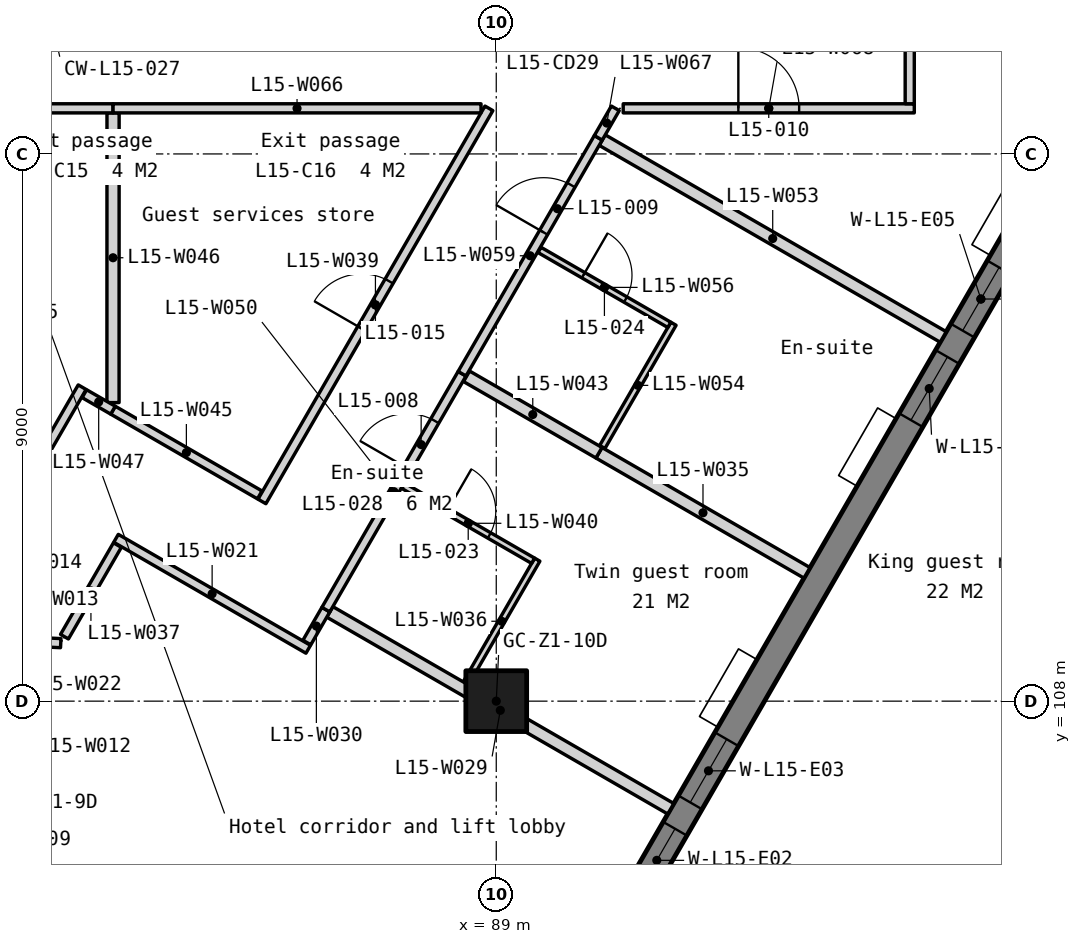
"""IFC4 building model, lengths in metres.
Left out: names, types, materials, properties, quantities, classifications, styles, units other than length and angle.
Written with IfcOpenShell. Run it as: python <this file> out.ifc"""

import sys

from ifc_helpers import new_model, si_unit, direction, frame, frame_2d, origin, origin_2d, place, context, subcontext, project, spatial, polyline, rectangle, outline, extrude, element, fill, save


model = new_model("IFC4")
c1 = context("Model", 3, precision=1e-05, world=origin(), true_north=direction((0.0, 1.0)))
c2 = subcontext(c1, "Body", "Model", "MODEL_VIEW")
j1 = project(units=[si_unit("LENGTHUNIT", "METRE"), si_unit("PLANEANGLEUNIT", "RADIAN")], contexts=[c1])
p1 = place(None, origin())
s1 = spatial("IfcSite", under=j1, at=p1, CompositionType="ELEMENT")
p2 = place(p1, origin())
s2 = spatial("IfcBuilding", under=s1, at=p2, CompositionType="ELEMENT")
p3 = place(p2, frame((0.0, 0.0, 66.5)))
s3 = spatial("IfcBuildingStorey", under=s2, at=p3, CompositionType="ELEMENT", Elevation=66.5)
p4 = place(p3, frame((89.0, 108.0, 0.0), z_axis=(0.0, 0.0, 1.0), x_axis=(1.0, 0.0, 0.0)))
e1 = element("IfcColumn", 1, at=p4, inside=s3, PredefinedType="COLUMN", context=c2, shape_type="SweptSolid", body=[
    extrude(rectangle(XDim=1.0, YDim=1.0, at=origin_2d()), origin(), (0.0, 0.0, 1.0), 3.5),
])
p5 = place(p3, frame((88.435, 99.831, -0.15), z_axis=(0.0, 0.0, 1.0), x_axis=(0.500000806382, 0.866024938219, 0.0)))
e2 = element("IfcWall", 2, at=p5, inside=s3, PredefinedType="SOLIDWALL", context=c2, shape_type="SweptSolid", body=[
    extrude(outline(polyline([(34.14, 3.5), (34.14, 0.0), (0.0, 0.0), (0.0, 3.5), (34.14, 3.5)])), frame((0.0, 0.225, 0.0), z_axis=(0.0, -1.0, 0.0), x_axis=(1.0, 0.0, 0.0)), (0.0, 0.0, 1.0), 0.45),
])
p6 = place(p5, frame((5.81, 0.0, 1.05)))
e3 = element("IfcOpeningElement", 3, at=p6, cuts=e2, PredefinedType="OPENING", context=c2, shape_type="SweptSolid", body=[
    extrude(rectangle(XDim=1.2, YDim=1.5, at=frame_2d((0.6, 0.75))), frame((0.0, 0.235, 0.0), z_axis=(0.0, -1.0, 0.0), x_axis=(1.0, 0.0, 0.0)), (0.0, 0.0, 1.0), 0.47),
])
p7 = place(p5, frame((7.51, 0.0, 1.05)))
e4 = element("IfcOpeningElement", 4, at=p7, cuts=e2, PredefinedType="OPENING", context=c2, shape_type="SweptSolid", body=[
    extrude(rectangle(XDim=1.2, YDim=1.5, at=frame_2d((0.6, 0.75))), frame((0.0, 0.235, 0.0), z_axis=(0.0, -1.0, 0.0), x_axis=(1.0, 0.0, 0.0)), (0.0, 0.0, 1.0), 0.47),
])
p8 = place(p5, frame((14.77, 0.0, 1.05)))
e5 = element("IfcOpeningElement", 5, at=p8, cuts=e2, PredefinedType="OPENING", context=c2, shape_type="SweptSolid", body=[
    extrude(rectangle(XDim=1.2, YDim=1.5, at=frame_2d((0.6, 0.75))), frame((0.0, 0.235, 0.0), z_axis=(0.0, -1.0, 0.0), x_axis=(1.0, 0.0, 0.0)), (0.0, 0.0, 1.0), 0.47),
])
p9 = place(p5, frame((16.47, 0.0, 1.05)))
e6 = element("IfcOpeningElement", 6, at=p9, cuts=e2, PredefinedType="OPENING", context=c2, shape_type="SweptSolid", body=[
    extrude(rectangle(XDim=1.2, YDim=1.5, at=frame_2d((0.6, 0.75))), frame((0.0, 0.235, 0.0), z_axis=(0.0, -1.0, 0.0), x_axis=(1.0, 0.0, 0.0)), (0.0, 0.0, 1.0), 0.47),
])
p10 = place(p5, frame((23.73, 0.0, 1.05)))
e7 = element("IfcOpeningElement", 7, at=p10, cuts=e2, PredefinedType="OPENING", context=c2, shape_type="SweptSolid", body=[
    extrude(rectangle(XDim=1.2, YDim=1.5, at=frame_2d((0.6, 0.75))), frame((0.0, 0.235, 0.0), z_axis=(0.0, -1.0, 0.0), x_axis=(1.0, 0.0, 0.0)), (0.0, 0.0, 1.0), 0.47),
])
p11 = place(p5, frame((25.43, 0.0, 1.05)))
e8 = element("IfcOpeningElement", 8, at=p11, cuts=e2, PredefinedType="OPENING", context=c2, shape_type="SweptSolid", body=[
    extrude(rectangle(XDim=1.2, YDim=1.5, at=frame_2d((0.6, 0.75))), frame((0.0, 0.235, 0.0), z_axis=(0.0, -1.0, 0.0), x_axis=(1.0, 0.0, 0.0)), (0.0, 0.0, 1.0), 0.47),
])
p12 = place(p5, frame((32.218, 0.0, 1.05)))
e9 = element("IfcOpeningElement", 9, at=p12, cuts=e2, PredefinedType="OPENING", context=c2, shape_type="SweptSolid", body=[
    extrude(rectangle(XDim=1.2, YDim=1.5, at=frame_2d((0.6, 0.75))), frame((0.0, 0.235, 0.0), z_axis=(0.0, -1.0, 0.0), x_axis=(1.0, 0.0, 0.0)), (0.0, 0.0, 1.0), 0.47),
])
p13 = place(p3, frame((82.747, 110.678, 0.0), z_axis=(0.0, 0.0, 1.0), x_axis=(0.866024069551, -0.500002310952, 0.0)))
e10 = element("IfcWall", 10, at=p13, inside=s3, PredefinedType="PARTITIONING", context=c2, shape_type="SweptSolid", body=[
    extrude(rectangle(XDim=3.65, YDim=0.15, at=frame_2d((1.825, 0.0))), origin(), (0.0, 0.0, 1.0), 3.35),
])
p14 = place(p3, frame((80.9, 109.0, 0.0), z_axis=(0.0, 0.0, 1.0), x_axis=(0.998790953554, -0.049159242245, 0.0)))
e11 = element("IfcWall", 11, at=p14, inside=s3, PredefinedType="PARTITIONING", context=c2, shape_type="SweptSolid", body=[
    extrude(rectangle(XDim=0.939, YDim=0.15, at=frame_2d((0.469, 0.0))), origin(), (0.0, 0.0, 1.0), 3.35),
])
p15 = place(p3, frame((79.852, 109.112, 0.0), z_axis=(0.0, 0.0, 1.0), x_axis=(0.499871526978, 0.866099565013, 0.0)))
e12 = element("IfcWall", 12, at=p15, inside=s3, PredefinedType="PARTITIONING", context=c2, shape_type="SweptSolid", body=[
    extrude(rectangle(XDim=4.678, YDim=0.15, at=frame_2d((2.339, 0.0))), origin(), (0.0, 0.0, 1.0), 3.35),
])
p16 = place(p15, frame((1.889, 0.0, 0.0)))
e13 = element("IfcOpeningElement", 13, at=p16, cuts=e12, PredefinedType="OPENING", context=c2, shape_type="SweptSolid", body=[
    extrude(rectangle(XDim=0.9, YDim=2.1, at=frame_2d((0.45, 1.05))), frame((0.0, 0.085, 0.0), z_axis=(0.0, -1.0, 0.0), x_axis=(1.0, 0.0, 0.0)), (0.0, 0.0, 1.0), 0.17),
])
p17 = place(p3, frame((86.263, 109.468, 0.0), z_axis=(0.0, 0.0, 1.0), x_axis=(0.866027988781, -0.499995522627, 0.0)))
e14 = element("IfcWall", 14, at=p17, inside=s3, PredefinedType="PARTITIONING", context=c2, shape_type="SweptSolid", body=[
    extrude(rectangle(XDim=6.475, YDim=0.2, at=frame_2d((3.238, 0.0))), origin(), (0.0, 0.0, 1.0), 3.35),
])
p18 = place(p3, frame((85.885, 108.964, 0.0), z_axis=(0.0, 0.0, 1.0), x_axis=(0.500004234368, 0.866022959057, 0.0)))
e15 = element("IfcWall", 15, at=p18, inside=s3, PredefinedType="PARTITIONING", context=c2, shape_type="SweptSolid", body=[
    extrude(rectangle(XDim=0.625, YDim=0.15, at=frame_2d((0.312, 0.0))), origin(), (0.0, 0.0, 1.0), 3.35),
])
p19 = place(p3, frame((90.689, 112.085, 0.0), z_axis=(0.0, 0.0, 1.0), x_axis=(0.866047669374, -0.499961432884, 0.0)))
e16 = element("IfcWall", 16, at=p19, inside=s3, PredefinedType="PARTITIONING", context=c2, shape_type="SweptSolid", body=[
    extrude(rectangle(XDim=3.95, YDim=0.2, at=frame_2d((1.975, 0.0))), origin(), (0.0, 0.0, 1.0), 3.35),
])
p20 = place(p3, frame((88.504, 108.301, 0.0), z_axis=(0.0, 0.0, 1.0), x_axis=(0.500077683152, 0.86598054875, 0.0)))
e17 = element("IfcWall", 17, at=p20, inside=s3, PredefinedType="PARTITIONING", context=c2, shape_type="SweptSolid", body=[
    extrude(rectangle(XDim=2.34, YDim=0.1, at=frame_2d((1.17, 0.0))), origin(), (0.0, 0.0, 1.0), 3.35),
])
p21 = place(p3, frame((81.899, 109.06, 0.0), z_axis=(0.0, 0.0, 1.0), x_axis=(0.50022850446, 0.865893436472, 0.0)))
e18 = element("IfcWall", 18, at=p21, inside=s3, PredefinedType="PARTITIONING", context=c2, shape_type="SweptSolid", body=[
    extrude(rectangle(XDim=1.74, YDim=0.15, at=frame_2d((0.87, 0.0))), origin(), (0.0, 0.0, 1.0), 3.35),
])
p22 = place(p3, frame((85.146, 111.284, 0.0), z_axis=(0.0, 0.0, 1.0), x_axis=(0.500000804965, 0.866024939037, 0.0)))
e19 = element("IfcWall", 19, at=p22, inside=s3, PredefinedType="PARTITIONING", context=c2, shape_type="SweptSolid", body=[
    extrude(rectangle(XDim=7.466, YDim=0.15, at=frame_2d((3.733, 0.0))), origin(), (0.0, 0.0, 1.0), 3.35),
])
p23 = place(p22, frame((3.283, 0.0, 0.0)))
e20 = element("IfcOpeningElement", 20, at=p23, cuts=e19, PredefinedType="OPENING", context=c2, shape_type="SweptSolid", body=[
    extrude(rectangle(XDim=0.9, YDim=2.1, at=frame_2d((0.45, 1.05))), frame((0.0, 0.085, 0.0), z_axis=(0.0, -1.0, 0.0), x_axis=(1.0, 0.0, 0.0)), (0.0, 0.0, 1.0), 0.17),
])
p24 = place(p3, frame((87.471, 111.542, 0.0), z_axis=(0.0, 0.0, 1.0), x_axis=(0.865997559407, -0.500048224776, 0.0)))
e21 = element("IfcWall", 21, at=p24, inside=s3, PredefinedType="PARTITIONING", context=c2, shape_type="SweptSolid", body=[
    extrude(rectangle(XDim=2.465, YDim=0.1, at=frame_2d((1.232, 0.0))), origin(), (0.0, 0.0, 1.0), 3.35),
])
p25 = place(p24, frame((0.833, 0.0, 0.0)))
e22 = element("IfcOpeningElement", 22, at=p25, cuts=e21, PredefinedType="OPENING", context=c2, shape_type="SweptSolid", body=[
    extrude(rectangle(XDim=0.8, YDim=2.1, at=frame_2d((0.4, 1.05))), frame((0.0, 0.06, 0.0), z_axis=(0.0, -1.0, 0.0), x_axis=(1.0, 0.0, 0.0)), (0.0, 0.0, 1.0), 0.12),
])
p26 = place(p3, frame((88.511, 113.343, 0.0), z_axis=(0.0, 0.0, 1.0), x_axis=(0.866006140796, -0.500033362991, 0.0)))
e23 = element("IfcWall", 23, at=p26, inside=s3, PredefinedType="PARTITIONING", context=c2, shape_type="SweptSolid", body=[
    extrude(rectangle(XDim=2.515, YDim=0.2, at=frame_2d((1.257, 0.0))), origin(), (0.0, 0.0, 1.0), 3.35),
])
p27 = place(p3, frame((82.697, 112.785, 0.0), z_axis=(0.0, 0.0, 1.0), x_axis=(0.865991541626, -0.500058646393, 0.0)))
e24 = element("IfcWall", 24, at=p27, inside=s3, PredefinedType="PARTITIONING", context=c2, shape_type="SweptSolid", body=[
    extrude(rectangle(XDim=2.787, YDim=0.15, at=frame_2d((1.394, 0.0))), origin(), (0.0, 0.0, 1.0), 3.35),
])
p28 = place(p3, frame((82.697, 112.91, 0.0), z_axis=(0.0, 0.0, 1.0), x_axis=(0.000204960028, 0.999999978996, 0.0)))
e25 = element("IfcWall", 25, at=p28, inside=s3, PredefinedType="PARTITIONING", context=c2, shape_type="SweptSolid", body=[
    extrude(rectangle(XDim=4.765, YDim=0.2, at=frame_2d((2.382, 0.0))), origin(), (0.0, 0.0, 1.0), 3.35),
])
p29 = place(p3, frame((82.226, 113.057, 0.0), z_axis=(0.0, 0.0, 1.0), x_axis=(0.866439850202, -0.499281469696, 0.0)))
e26 = element("IfcWall", 26, at=p29, inside=s3, PredefinedType="PARTITIONING", context=c2, shape_type="SweptSolid", body=[
    extrude(rectangle(XDim=0.543, YDim=0.15, at=frame_2d((0.271, 0.0))), origin(), (0.0, 0.0, 1.0), 3.35),
])
p30 = place(p3, frame((86.198, 109.505, 0.0), z_axis=(0.0, 0.0, 1.0), x_axis=(0.499989762656, 0.866031314237, 0.0)))
e27 = element("IfcWall", 27, at=p30, inside=s3, PredefinedType="PARTITIONING", context=c2, shape_type="SweptSolid", body=[
    extrude(rectangle(XDim=4.48, YDim=0.15, at=frame_2d((2.24, 0.0))), origin(), (0.0, 0.0, 1.0), 3.35),
])
p31 = place(p30, frame((2.684, 0.0, 0.0)))
e28 = element("IfcOpeningElement", 28, at=p31, cuts=e27, PredefinedType="OPENING", context=c2, shape_type="SweptSolid", body=[
    extrude(rectangle(XDim=0.9, YDim=2.1, at=frame_2d((0.45, 1.05))), frame((0.0, 0.085, 0.0), z_axis=(0.0, -1.0, 0.0), x_axis=(1.0, 0.0, 0.0)), (0.0, 0.0, 1.0), 0.17),
])
p32 = place(p3, frame((90.743, 117.228, 0.0), z_axis=(0.0, 0.0, 1.0), x_axis=(0.866027988781, -0.499995522627, 0.0)))
e29 = element("IfcWall", 29, at=p32, inside=s3, PredefinedType="PARTITIONING", context=c2, shape_type="SweptSolid", body=[
    extrude(rectangle(XDim=6.475, YDim=0.2, at=frame_2d((3.238, 0.0))), origin(), (0.0, 0.0, 1.0), 3.35),
])
p33 = place(p3, frame((90.744, 112.18, 0.0), z_axis=(0.0, 0.0, 1.0), x_axis=(0.500032503492, 0.866006637072, 0.0)))
e30 = element("IfcWall", 30, at=p33, inside=s3, PredefinedType="PARTITIONING", context=c2, shape_type="SweptSolid", body=[
    extrude(rectangle(XDim=2.34, YDim=0.1, at=frame_2d((1.17, 0.0))), origin(), (0.0, 0.0, 1.0), 3.35),
])
p34 = place(p3, frame((89.711, 115.421, 0.0), z_axis=(0.0, 0.0, 1.0), x_axis=(0.866040446274, -0.499973944738, 0.0)))
e31 = element("IfcWall", 31, at=p34, inside=s3, PredefinedType="PARTITIONING", context=c2, shape_type="SweptSolid", body=[
    extrude(rectangle(XDim=2.465, YDim=0.1, at=frame_2d((1.232, 0.0))), origin(), (0.0, 0.0, 1.0), 3.35),
])
p35 = place(p34, frame((0.833, 0.0, 0.0)))
e32 = element("IfcOpeningElement", 32, at=p35, cuts=e31, PredefinedType="OPENING", context=c2, shape_type="SweptSolid", body=[
    extrude(rectangle(XDim=0.8, YDim=2.1, at=frame_2d((0.4, 1.05))), frame((0.0, 0.06, 0.0), z_axis=(0.0, -1.0, 0.0), x_axis=(1.0, 0.0, 0.0)), (0.0, 0.0, 1.0), 0.12),
])
p36 = place(p3, frame((88.438, 113.385, 0.0), z_axis=(0.0, 0.0, 1.0), x_axis=(0.499989762656, 0.866031314237, 0.0)))
e33 = element("IfcWall", 33, at=p36, inside=s3, PredefinedType="PARTITIONING", context=c2, shape_type="SweptSolid", body=[
    extrude(rectangle(XDim=4.48, YDim=0.15, at=frame_2d((2.24, 0.0))), origin(), (0.0, 0.0, 1.0), 3.35),
])
p37 = place(p36, frame((2.684, 0.0, 0.0)))
e34 = element("IfcOpeningElement", 34, at=p37, cuts=e33, PredefinedType="OPENING", context=c2, shape_type="SweptSolid", body=[
    extrude(rectangle(XDim=0.9, YDim=2.1, at=frame_2d((0.45, 1.05))), frame((0.0, 0.085, 0.0), z_axis=(0.0, -1.0, 0.0), x_axis=(1.0, 0.0, 0.0)), (0.0, 0.0, 1.0), 0.17),
])
p38 = place(p3, frame((78.994, 117.75, 0.0), z_axis=(0.0, 0.0, 1.0), x_axis=(1.0, 0.0, 0.0)))
e35 = element("IfcWall", 35, at=p38, inside=s3, PredefinedType="PARTITIONING", context=c2, shape_type="SweptSolid", body=[
    extrude(rectangle(XDim=3.704, YDim=0.15, at=frame_2d((1.852, 0.0))), origin(), (0.0, 0.0, 1.0), 3.35),
])
p39 = place(p3, frame((82.698, 117.75, 0.0), z_axis=(0.0, 0.0, 1.0), x_axis=(1.0, 0.0, 0.0)))
e36 = element("IfcWall", 36, at=p39, inside=s3, PredefinedType="PARTITIONING", context=c2, shape_type="SweptSolid", body=[
    extrude(rectangle(XDim=6.052, YDim=0.15, at=frame_2d((3.026, 0.0))), origin(), (0.0, 0.0, 1.0), 3.35),
])
p40 = place(p3, frame((90.678, 117.265, 0.0), z_axis=(0.0, 0.0, 1.0), x_axis=(0.50012503653, 0.865953201874, 0.0)))
e37 = element("IfcWall", 37, at=p40, inside=s3, PredefinedType="PARTITIONING", context=c2, shape_type="SweptSolid", body=[
    extrude(rectangle(XDim=0.56, YDim=0.15, at=frame_2d((0.28, 0.0))), origin(), (0.0, 0.0, 1.0), 3.35),
])
p41 = place(p3, frame((91.088, 117.75, 0.0), z_axis=(0.0, 0.0, 1.0), x_axis=(1.0, 0.0, 0.0)))
e38 = element("IfcWall", 38, at=p41, inside=s3, PredefinedType="PARTITIONING", context=c2, shape_type="SweptSolid", body=[
    extrude(rectangle(XDim=4.787, YDim=0.15, at=frame_2d((2.394, 0.0))), origin(), (0.0, 0.0, 1.0), 3.35),
])
p42 = place(p41, frame((1.894, 0.0, 0.0)))
e39 = element("IfcOpeningElement", 39, at=p42, cuts=e38, PredefinedType="OPENING", context=c2, shape_type="SweptSolid", body=[
    extrude(rectangle(XDim=1.0, YDim=2.1, at=frame_2d((0.5, 1.05))), frame((0.0, 0.085, 0.0), z_axis=(0.0, -1.0, 0.0), x_axis=(1.0, 0.0, 0.0)), (0.0, 0.0, 1.0), 0.17),
])
p43 = place(p3, frame((95.8, 117.825, 0.0), z_axis=(0.0, 0.0, 1.0), x_axis=(0.0, 1.0, 0.0)))
e40 = element("IfcWall", 40, at=p43, inside=s3, PredefinedType="PARTITIONING", context=c2, shape_type="SweptSolid", body=[
    extrude(rectangle(XDim=3.711, YDim=0.15, at=frame_2d((1.855, 0.0))), origin(), (0.0, 0.0, 1.0), 3.35),
])
p44 = place(p6, origin())
e41 = element("IfcWindow", 41, at=p44, inside=s3, PartitioningType="SINGLE_PANEL", PredefinedType="WINDOW", context=c2, shape_type="SweptSolid", body=[
    extrude(rectangle(XDim=1.2, YDim=1.5, at=frame_2d((0.6, 0.75))), frame((0.0, 0.03, 0.0), z_axis=(0.0, -1.0, 0.0), x_axis=(1.0, 0.0, 0.0)), (0.0, 0.0, 1.0), 0.06),
])
fill(e3, e41)
p45 = place(p7, origin())
e42 = element("IfcWindow", 42, at=p45, inside=s3, PartitioningType="SINGLE_PANEL", PredefinedType="WINDOW", context=c2, shape_type="SweptSolid", body=[
    extrude(rectangle(XDim=1.2, YDim=1.5, at=frame_2d((0.6, 0.75))), frame((0.0, 0.03, 0.0), z_axis=(0.0, -1.0, 0.0), x_axis=(1.0, 0.0, 0.0)), (0.0, 0.0, 1.0), 0.06),
])
fill(e4, e42)
p46 = place(p8, origin())
e43 = element("IfcWindow", 43, at=p46, inside=s3, PartitioningType="SINGLE_PANEL", PredefinedType="WINDOW", context=c2, shape_type="SweptSolid", body=[
    extrude(rectangle(XDim=1.2, YDim=1.5, at=frame_2d((0.6, 0.75))), frame((0.0, 0.03, 0.0), z_axis=(0.0, -1.0, 0.0), x_axis=(1.0, 0.0, 0.0)), (0.0, 0.0, 1.0), 0.06),
])
fill(e5, e43)
p47 = place(p9, origin())
e44 = element("IfcWindow", 44, at=p47, inside=s3, PartitioningType="SINGLE_PANEL", PredefinedType="WINDOW", context=c2, shape_type="SweptSolid", body=[
    extrude(rectangle(XDim=1.2, YDim=1.5, at=frame_2d((0.6, 0.75))), frame((0.0, 0.03, 0.0), z_axis=(0.0, -1.0, 0.0), x_axis=(1.0, 0.0, 0.0)), (0.0, 0.0, 1.0), 0.06),
])
fill(e6, e44)
p48 = place(p31, origin())
e45 = element("IfcDoor", 45, at=p48, inside=s3, OperationType="SINGLE_SWING_LEFT", PredefinedType="DOOR", context=c2, shape_type="SweptSolid", body=[
    extrude(rectangle(XDim=0.9, YDim=2.1, at=frame_2d((0.45, 1.05))), frame((0.0, 0.025, 0.0), z_axis=(0.0, -1.0, 0.0), x_axis=(1.0, 0.0, 0.0)), (0.0, 0.0, 1.0), 0.05),
])
fill(e28, e45)
p49 = place(p37, origin())
e46 = element("IfcDoor", 46, at=p49, inside=s3, OperationType="SINGLE_SWING_LEFT", PredefinedType="DOOR", context=c2, shape_type="SweptSolid", body=[
    extrude(rectangle(XDim=0.9, YDim=2.1, at=frame_2d((0.45, 1.05))), frame((0.0, 0.025, 0.0), z_axis=(0.0, -1.0, 0.0), x_axis=(1.0, 0.0, 0.0)), (0.0, 0.0, 1.0), 0.05),
])
fill(e34, e46)
p50 = place(p42, origin())
e47 = element("IfcDoor", 47, at=p50, inside=s3, OperationType="SINGLE_SWING_LEFT", PredefinedType="DOOR", context=c2, shape_type="SweptSolid", body=[
    extrude(rectangle(XDim=1.0, YDim=2.1, at=frame_2d((0.5, 1.05))), frame((0.0, 0.025, 0.0), z_axis=(0.0, -1.0, 0.0), x_axis=(1.0, 0.0, 0.0)), (0.0, 0.0, 1.0), 0.05),
])
fill(e39, e47)
p51 = place(p23, origin())
e48 = element("IfcDoor", 48, at=p51, inside=s3, OperationType="SINGLE_SWING_LEFT", PredefinedType="DOOR", context=c2, shape_type="SweptSolid", body=[
    extrude(rectangle(XDim=0.9, YDim=2.1, at=frame_2d((0.45, 1.05))), frame((0.0, 0.025, 0.0), z_axis=(0.0, -1.0, 0.0), x_axis=(1.0, 0.0, 0.0)), (0.0, 0.0, 1.0), 0.05),
])
fill(e20, e48)
p52 = place(p25, origin())
e49 = element("IfcDoor", 49, at=p52, inside=s3, OperationType="SINGLE_SWING_LEFT", PredefinedType="DOOR", context=c2, shape_type="SweptSolid", body=[
    extrude(rectangle(XDim=0.8, YDim=2.1, at=frame_2d((0.4, 1.05))), frame((0.0, 0.025, 0.0), z_axis=(0.0, -1.0, 0.0), x_axis=(1.0, 0.0, 0.0)), (0.0, 0.0, 1.0), 0.05),
])
fill(e22, e49)
p53 = place(p35, origin())
e50 = element("IfcDoor", 50, at=p53, inside=s3, OperationType="SINGLE_SWING_LEFT", PredefinedType="DOOR", context=c2, shape_type="SweptSolid", body=[
    extrude(rectangle(XDim=0.8, YDim=2.1, at=frame_2d((0.4, 1.05))), frame((0.0, 0.025, 0.0), z_axis=(0.0, -1.0, 0.0), x_axis=(1.0, 0.0, 0.0)), (0.0, 0.0, 1.0), 0.05),
])
fill(e32, e50)
save(model, sys.argv[1])
